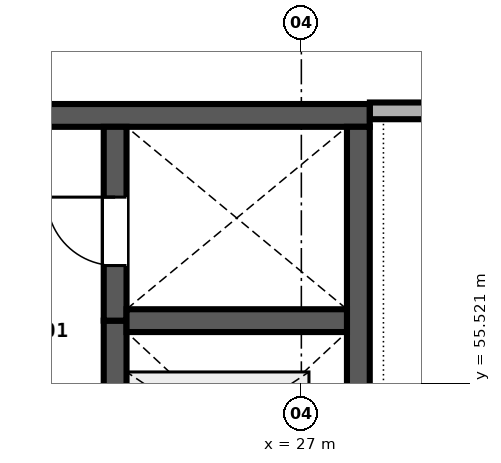
"""IFC4 building model, lengths in metres.
Left out: names, types, materials, properties, quantities, classifications, styles, units other than length and angle.
Written with IfcOpenShell. Run it as: python <this file> out.ifc"""

import sys

from ifc_helpers import new_model, si_unit, direction, frame, frame_2d, origin, place, context, subcontext, project, spatial, rectangle, extrude, element, fill, save


model = new_model("IFC4")
c1 = context("Model", 3, precision=1e-05, world=origin(), true_north=direction((0.0, 1.0)))
c2 = subcontext(c1, "Body", "Model", "MODEL_VIEW")
j1 = project(units=[si_unit("LENGTHUNIT", "METRE"), si_unit("PLANEANGLEUNIT", "RADIAN")], contexts=[c1])
p1 = place(None, origin())
s1 = spatial("IfcSite", under=j1, at=p1, CompositionType="ELEMENT")
p2 = place(p1, origin())
s2 = spatial("IfcBuilding", under=s1, at=p2, CompositionType="ELEMENT")
p3 = place(p2, frame((0.0, 0.0, 24.0)))
s3 = spatial("IfcBuildingStorey", under=s2, at=p3, CompositionType="ELEMENT", Elevation=24.0)
p4 = place(p3, frame((27.9, 59.05, 0.0), z_axis=(0.0, 0.0, 1.0), x_axis=(-1.0, 0.0, 0.0)))
e1 = element("IfcWall", 1, at=p4, inside=s3, PredefinedType="SHEAR", context=c2, shape_type="SweptSolid", body=[
    extrude(rectangle(XDim=18.0, YDim=0.3, at=frame_2d((9.0, 0.0))), origin(), (0.0, 0.0, 1.0), 4.56),
])
p5 = place(p4, frame((4.7, 0.0, 0.0)))
e2 = element("IfcOpeningElement", 2, at=p5, cuts=e1, PredefinedType="OPENING", context=c2, shape_type="SweptSolid", body=[
    extrude(rectangle(XDim=1.9, YDim=2.25, at=frame_2d((0.95, 1.125))), frame((0.0, 0.16, 0.0), z_axis=(0.0, -1.0, 0.0), x_axis=(1.0, 0.0, 0.0)), (0.0, 0.0, 1.0), 0.32),
])
p6 = place(p3, frame((27.75, 53.5, 0.0), z_axis=(0.0, 0.0, 1.0), x_axis=(0.0, 1.0, 0.0)))
e3 = element("IfcWall", 3, at=p6, inside=s3, PredefinedType="SHEAR", context=c2, shape_type="SweptSolid", body=[
    extrude(rectangle(XDim=5.4, YDim=0.3, at=frame_2d((2.7, 0.0))), origin(), (0.0, 0.0, 1.0), 4.56),
])
p7 = place(p3, frame((24.55, 53.5, 0.0), z_axis=(0.0, 0.0, 1.0), x_axis=(0.0, 1.0, 0.0)))
e4 = element("IfcWall", 4, at=p7, inside=s3, PredefinedType="SHEAR", context=c2, shape_type="SweptSolid", body=[
    extrude(rectangle(XDim=2.85, YDim=0.3, at=frame_2d((1.425, 0.0))), origin(), (0.0, 0.0, 1.0), 4.56),
])
p8 = place(p7, frame((0.775, 0.0, 0.0)))
e5 = element("IfcOpeningElement", 5, at=p8, cuts=e4, PredefinedType="OPENING", context=c2, shape_type="SweptSolid", body=[
    extrude(rectangle(XDim=1.1, YDim=2.1, at=frame_2d((0.55, 1.05))), frame((0.0, 0.16, 0.0), z_axis=(0.0, -1.0, 0.0), x_axis=(1.0, 0.0, 0.0)), (0.0, 0.0, 1.0), 0.32),
])
p9 = place(p3, frame((24.55, 56.35, 0.0), z_axis=(0.0, 0.0, 1.0), x_axis=(0.0, 1.0, 0.0)))
e6 = element("IfcWall", 6, at=p9, inside=s3, PredefinedType="SHEAR", context=c2, shape_type="SweptSolid", body=[
    extrude(rectangle(XDim=2.55, YDim=0.3, at=frame_2d((1.275, 0.0))), origin(), (0.0, 0.0, 1.0), 4.56),
])
p10 = place(p9, frame((0.725, 0.0, 0.0)))
e7 = element("IfcOpeningElement", 7, at=p10, cuts=e6, PredefinedType="OPENING", context=c2, shape_type="SweptSolid", body=[
    extrude(rectangle(XDim=0.9, YDim=2.1, at=frame_2d((0.45, 1.05))), frame((0.0, 0.16, 0.0), z_axis=(0.0, -1.0, 0.0), x_axis=(1.0, 0.0, 0.0)), (0.0, 0.0, 1.0), 0.32),
])
p11 = place(p3, frame((24.7, 56.35, 0.0), z_axis=(0.0, 0.0, 1.0), x_axis=(1.0, 0.0, 0.0)))
e8 = element("IfcWall", 8, at=p11, inside=s3, PredefinedType="SHEAR", context=c2, shape_type="SweptSolid", body=[
    extrude(rectangle(XDim=2.9, YDim=0.3, at=frame_2d((1.45, 0.0))), origin(), (0.0, 0.0, 1.0), 4.56),
])
p12 = place(p3, frame((27.902, 59.11, 0.0), z_axis=(0.0, 0.0, 1.0), x_axis=(1.0, 0.0, 0.0)))
e9 = element("IfcWall", 9, at=p12, inside=s3, PredefinedType="PARTITIONING", context=c2, shape_type="SweptSolid", body=[
    extrude(rectangle(XDim=2.038, YDim=0.22, at=frame_2d((1.019, 0.0))), origin(), (0.0, 0.0, 1.0), 3.56),
])
p13 = place(p10, origin())
e10 = element("IfcDoor", 10, at=p13, inside=s3, OperationType="SINGLE_SWING_RIGHT", PredefinedType="DOOR", context=c2, shape_type="SweptSolid", body=[
    extrude(rectangle(XDim=0.9, YDim=2.1, at=frame_2d((0.45, 1.05))), frame((0.0, 0.025, 0.0), z_axis=(0.0, -1.0, 0.0), x_axis=(1.0, 0.0, 0.0)), (0.0, 0.0, 1.0), 0.05),
])
fill(e7, e10)
save(model, sys.argv[1])
